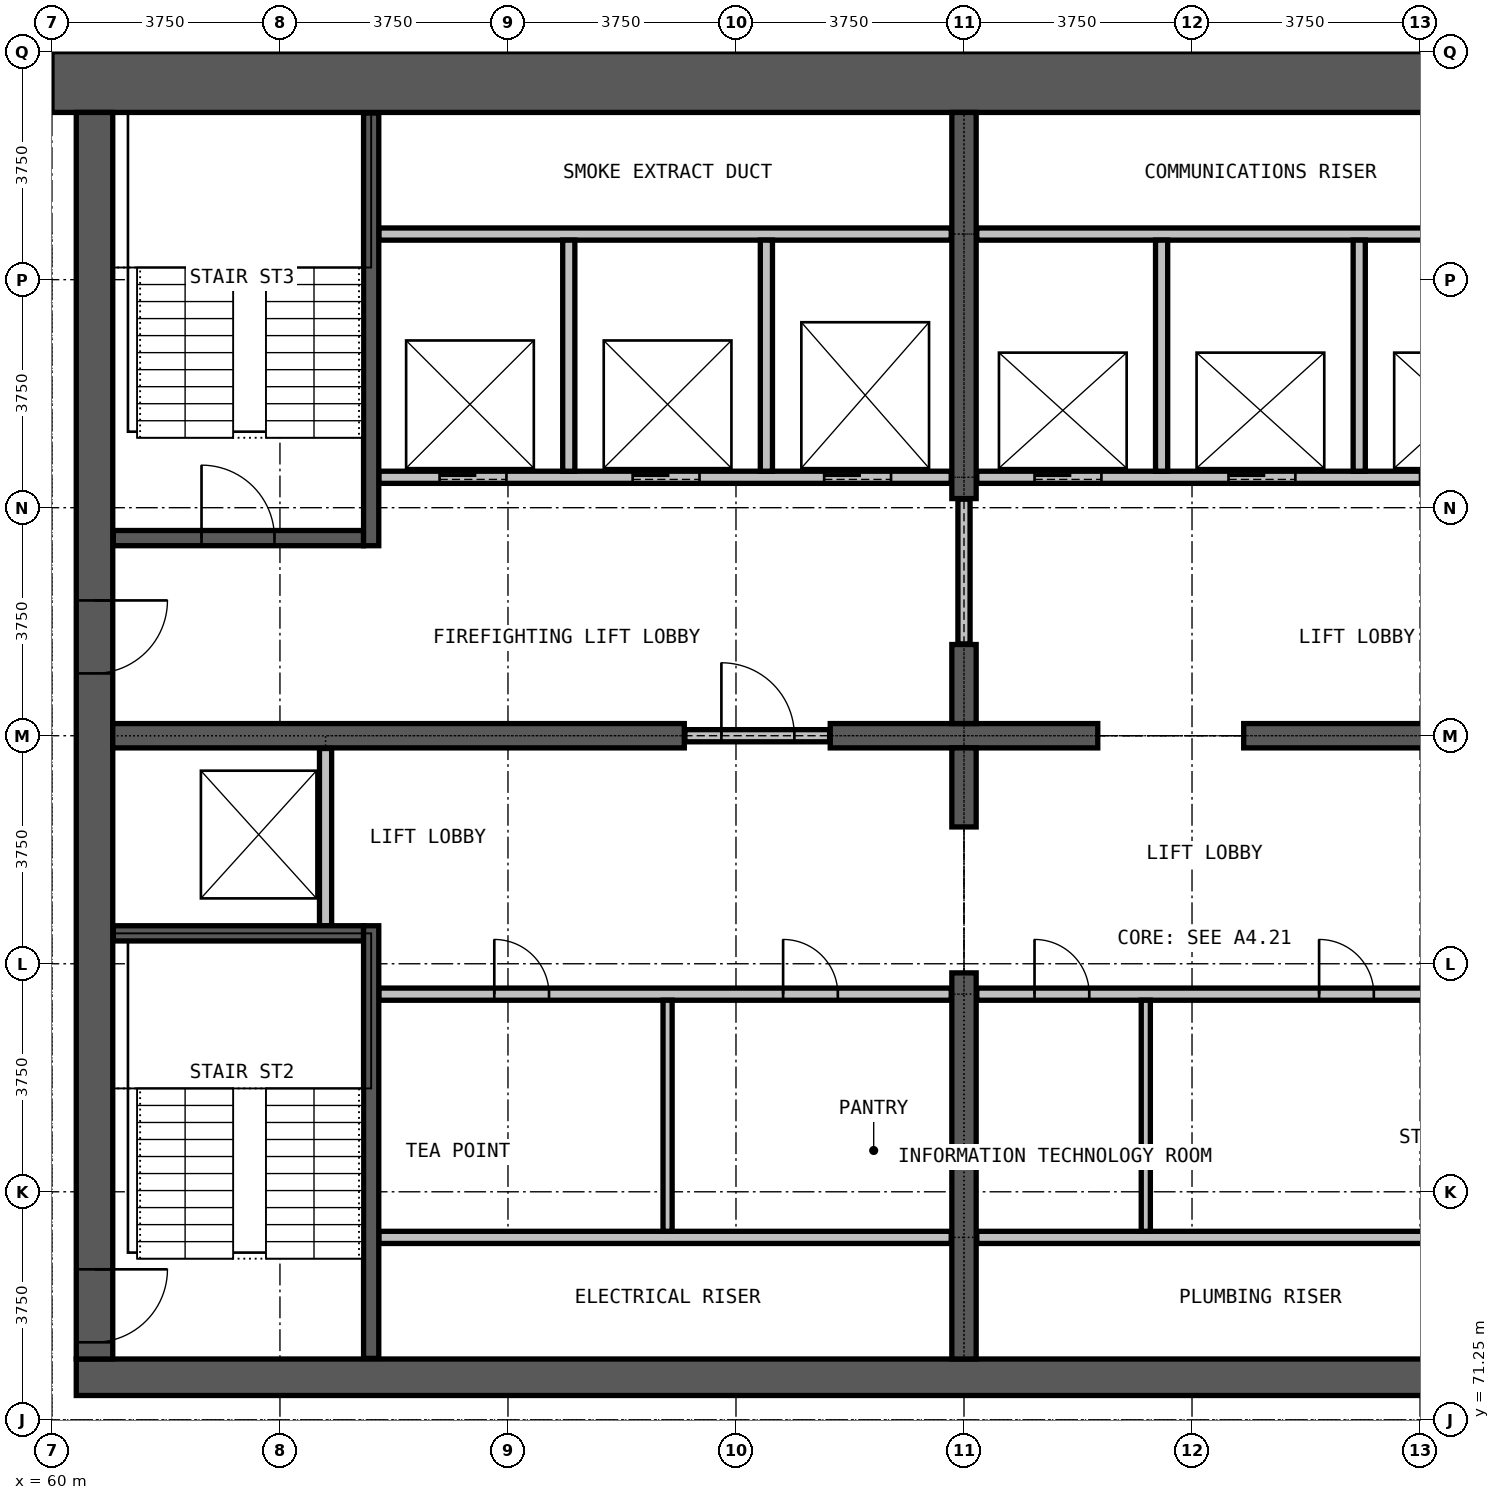
"""IFC4 building model, lengths in metres.
Left out: names, types, materials, properties, quantities, classifications, styles, units other than length and angle.
Written with IfcOpenShell. Run it as: python <this file> out.ifc"""

import sys

from ifc_helpers import new_model, si_unit, direction, frame, frame_2d, origin, place, context, subcontext, project, spatial, rectangle, extrude, element, fill, save


model = new_model("IFC4")
c1 = context("Model", 3, precision=1e-05, world=origin(), true_north=direction((0.0, 1.0)))
c2 = subcontext(c1, "Body", "Model", "MODEL_VIEW")
j1 = project(units=[si_unit("LENGTHUNIT", "METRE"), si_unit("PLANEANGLEUNIT", "RADIAN")], contexts=[c1])
p1 = place(None, origin())
s1 = spatial("IfcSite", under=j1, at=p1, CompositionType="ELEMENT")
p2 = place(p1, origin())
s2 = spatial("IfcBuilding", under=s1, at=p2, CompositionType="ELEMENT")
p3 = place(p2, frame((0.0, 0.0, 188.7)))
s3 = spatial("IfcBuildingStorey", under=s2, at=p3, CompositionType="ELEMENT", Elevation=188.7)
p4 = place(p3, frame((60.4, 71.95, 0.0), z_axis=(0.0, 0.0, 1.0), x_axis=(1.0, 0.0, 0.0)))
e1 = element("IfcWall", 1, at=p4, inside=s3, PredefinedType="SHEAR", context=c2, shape_type="SweptSolid", body=[
    extrude(rectangle(XDim=29.2, YDim=0.6, at=frame_2d((14.6, 0.0))), origin(), (0.0, 0.0, 1.0), 3.6),
])
p5 = place(p3, frame((90.0, 93.25, 0.0), z_axis=(0.0, 0.0, 1.0), x_axis=(-1.0, 0.0, 0.0)))
e2 = element("IfcWall", 2, at=p5, inside=s3, PredefinedType="SHEAR", context=c2, shape_type="SweptSolid", body=[
    extrude(rectangle(XDim=30.0, YDim=1.0, at=frame_2d((15.0, 0.0))), origin(), (0.0, 0.0, 1.0), 3.6),
])
p6 = place(p3, frame((60.7, 92.75, 0.0), z_axis=(0.0, 0.0, 1.0), x_axis=(0.0, -1.0, 0.0)))
e3 = element("IfcWall", 3, at=p6, inside=s3, PredefinedType="SHEAR", context=c2, shape_type="SweptSolid", body=[
    extrude(rectangle(XDim=20.5, YDim=0.6, at=frame_2d((10.25, 0.0))), origin(), (0.0, 0.0, 1.0), 3.6),
])
p7 = place(p6, frame((19.025, 0.0, 0.0)))
e4 = element("IfcOpeningElement", 4, at=p7, cuts=e3, PredefinedType="OPENING", context=c2, shape_type="SweptSolid", body=[
    extrude(rectangle(XDim=1.2, YDim=2.2, at=frame_2d((0.6, 1.1))), frame((0.0, 0.31, 0.0), z_axis=(0.0, -1.0, 0.0), x_axis=(1.0, 0.0, 0.0)), (0.0, 0.0, 1.0), 0.62),
])
p8 = place(p6, frame((8.025, 0.0, 0.0)))
e5 = element("IfcOpeningElement", 5, at=p8, cuts=e3, PredefinedType="OPENING", context=c2, shape_type="SweptSolid", body=[
    extrude(rectangle(XDim=1.2, YDim=2.2, at=frame_2d((0.6, 1.1))), frame((0.0, 0.31, 0.0), z_axis=(0.0, -1.0, 0.0), x_axis=(1.0, 0.0, 0.0)), (0.0, 0.0, 1.0), 0.62),
])
p9 = place(p3, frame((61.0, 82.5, 0.0), z_axis=(0.0, 0.0, 1.0), x_axis=(1.0, 0.0, 0.0)))
e6 = element("IfcWall", 6, at=p9, inside=s3, PredefinedType="SHEAR", context=c2, shape_type="SweptSolid", body=[
    extrude(rectangle(XDim=9.4, YDim=0.4, at=frame_2d((4.7, 0.0))), origin(), (0.0, 0.0, 1.0), 3.6),
])
p10 = place(p3, frame((72.8, 82.5, 0.0), z_axis=(0.0, 0.0, 1.0), x_axis=(1.0, 0.0, 0.0)))
e7 = element("IfcWall", 7, at=p10, inside=s3, PredefinedType="SHEAR", context=c2, shape_type="SweptSolid", body=[
    extrude(rectangle(XDim=4.4, YDim=0.4, at=frame_2d((2.2, 0.0))), origin(), (0.0, 0.0, 1.0), 3.6),
])
p11 = place(p3, frame((79.6, 82.5, 0.0), z_axis=(0.0, 0.0, 1.0), x_axis=(1.0, 0.0, 0.0)))
e8 = element("IfcWall", 8, at=p11, inside=s3, PredefinedType="SHEAR", context=c2, shape_type="SweptSolid", body=[
    extrude(rectangle(XDim=9.4, YDim=0.4, at=frame_2d((4.7, 0.0))), origin(), (0.0, 0.0, 1.0), 3.6),
])
p12 = place(p3, frame((75.0, 72.25, 0.0), z_axis=(0.0, 0.0, 1.0), x_axis=(0.0, 1.0, 0.0)))
e9 = element("IfcWall", 9, at=p12, inside=s3, PredefinedType="SHEAR", context=c2, shape_type="SweptSolid", body=[
    extrude(rectangle(XDim=6.35, YDim=0.4, at=frame_2d((3.175, 0.0))), origin(), (0.0, 0.0, 1.0), 3.6),
])
for number, where, z_axis, x_axis in (
    (10, (75.0, 81.0, 0.0), (0.0, 0.0, 1.0), (0.0, 1.0, 0.0)),
    (11, (75.0, 82.7, 0.0), (0.0, 0.0, 1.0), (0.0, 1.0, 0.0)),
):
    element("IfcWall", number, at=place(p3, frame(where, z_axis=z_axis, x_axis=x_axis)), inside=s3, PredefinedType="SHEAR", context=c2, shape_type="SweptSolid", body=[
        extrude(rectangle(XDim=1.3, YDim=0.4, at=frame_2d((0.65, 0.0))), origin(), (0.0, 0.0, 1.0), 3.6),
    ])
p13 = place(p3, frame((75.0, 86.4, 0.0), z_axis=(0.0, 0.0, 1.0), x_axis=(0.0, 1.0, 0.0)))
e12 = element("IfcWall", 12, at=p13, inside=s3, PredefinedType="SHEAR", context=c2, shape_type="SweptSolid", body=[
    extrude(rectangle(XDim=6.35, YDim=0.4, at=frame_2d((3.175, 0.0))), origin(), (0.0, 0.0, 1.0), 3.6),
])
for number, where, z_axis, x_axis in (
    (13, (65.375, 74.25, 0.0), (0.0, 0.0, 1.0), (1.0, 0.0, 0.0)),
    (14, (75.21, 74.25, 0.0), (0.0, 0.0, 1.0), (1.0, 0.0, 0.0)),
):
    element("IfcWall", number, at=place(p3, frame(where, z_axis=z_axis, x_axis=x_axis)), inside=s3, PredefinedType="PARTITIONING", context=c2, shape_type="SweptSolid", body=[
        extrude(rectangle(XDim=9.415, YDim=0.2, at=frame_2d((4.708, 0.0))), origin(), (0.0, 0.0, 1.0), 3.3),
    ])
p14 = place(p3, frame((65.375, 78.25, 0.0), z_axis=(0.0, 0.0, 1.0), x_axis=(1.0, 0.0, 0.0)))
e15 = element("IfcWall", 15, at=p14, inside=s3, PredefinedType="PARTITIONING", context=c2, shape_type="SweptSolid", body=[
    extrude(rectangle(XDim=9.415, YDim=0.2, at=frame_2d((4.708, 0.0))), origin(), (0.0, 0.0, 1.0), 3.3),
])
p15 = place(p14, frame((1.9, 0.0, 0.0)))
e16 = element("IfcOpeningElement", 16, at=p15, cuts=e15, PredefinedType="OPENING", context=c2, shape_type="SweptSolid", body=[
    extrude(rectangle(XDim=0.9, YDim=2.2, at=frame_2d((0.45, 1.1))), frame((0.0, 0.11, 0.0), z_axis=(0.0, -1.0, 0.0), x_axis=(1.0, 0.0, 0.0)), (0.0, 0.0, 1.0), 0.22),
])
p16 = place(p14, frame((6.65, 0.0, 0.0)))
e17 = element("IfcOpeningElement", 17, at=p16, cuts=e15, PredefinedType="OPENING", context=c2, shape_type="SweptSolid", body=[
    extrude(rectangle(XDim=0.9, YDim=2.2, at=frame_2d((0.45, 1.1))), frame((0.0, 0.11, 0.0), z_axis=(0.0, -1.0, 0.0), x_axis=(1.0, 0.0, 0.0)), (0.0, 0.0, 1.0), 0.22),
])
p17 = place(p3, frame((75.21, 78.25, 0.0), z_axis=(0.0, 0.0, 1.0), x_axis=(1.0, 0.0, 0.0)))
e18 = element("IfcWall", 18, at=p17, inside=s3, PredefinedType="PARTITIONING", context=c2, shape_type="SweptSolid", body=[
    extrude(rectangle(XDim=9.415, YDim=0.2, at=frame_2d((4.708, 0.0))), origin(), (0.0, 0.0, 1.0), 3.3),
])
p18 = place(p17, frame((0.95, 0.0, 0.0)))
e19 = element("IfcOpeningElement", 19, at=p18, cuts=e18, PredefinedType="OPENING", context=c2, shape_type="SweptSolid", body=[
    extrude(rectangle(XDim=0.9, YDim=2.2, at=frame_2d((0.45, 1.1))), frame((0.0, 0.11, 0.0), z_axis=(0.0, -1.0, 0.0), x_axis=(1.0, 0.0, 0.0)), (0.0, 0.0, 1.0), 0.22),
])
p19 = place(p17, frame((5.63, 0.0, 0.0)))
e20 = element("IfcOpeningElement", 20, at=p19, cuts=e18, PredefinedType="OPENING", context=c2, shape_type="SweptSolid", body=[
    extrude(rectangle(XDim=0.9, YDim=2.2, at=frame_2d((0.45, 1.1))), frame((0.0, 0.11, 0.0), z_axis=(0.0, -1.0, 0.0), x_axis=(1.0, 0.0, 0.0)), (0.0, 0.0, 1.0), 0.22),
])
p20 = place(p3, frame((70.41, 82.5, 0.0), z_axis=(0.0, 0.0, 1.0), x_axis=(1.0, 0.0, 0.0)))
e21 = element("IfcWall", 21, at=p20, inside=s3, PredefinedType="PARTITIONING", context=c2, shape_type="SweptSolid", body=[
    extrude(rectangle(XDim=2.38, YDim=0.2, at=frame_2d((1.19, 0.0))), origin(), (0.0, 0.0, 1.0), 2.4),
])
p21 = place(p20, frame((0.6, 0.0, 0.0)))
e22 = element("IfcOpeningElement", 22, at=p21, cuts=e21, PredefinedType="OPENING", context=c2, shape_type="SweptSolid", body=[
    extrude(rectangle(XDim=1.2, YDim=2.2, at=frame_2d((0.6, 1.1))), frame((0.0, 0.11, 0.0), z_axis=(0.0, -1.0, 0.0), x_axis=(1.0, 0.0, 0.0)), (0.0, 0.0, 1.0), 0.22),
])
p22 = place(p3, frame((75.0, 84.01, 0.0), z_axis=(0.0, 0.0, 1.0), x_axis=(0.0, 1.0, 0.0)))
e23 = element("IfcWall", 23, at=p22, inside=s3, PredefinedType="PARTITIONING", context=c2, shape_type="SweptSolid", body=[
    extrude(rectangle(XDim=2.38, YDim=0.2, at=frame_2d((1.19, 0.0))), origin(), (0.0, 0.0, 1.0), 2.4),
])
for number, where, z_axis, x_axis in (
    (24, (70.125, 74.35, 0.0), (0.0, 0.0, 1.0), (0.0, 1.0, 0.0)),
    (25, (77.99, 74.35, 0.0), (0.0, 0.0, 1.0), (0.0, 1.0, 0.0)),
):
    element("IfcWall", number, at=place(p3, frame(where, z_axis=z_axis, x_axis=x_axis)), inside=s3, PredefinedType="PARTITIONING", context=c2, shape_type="SweptSolid", body=[
        extrude(rectangle(XDim=3.8, YDim=0.15, at=frame_2d((1.9, 0.0))), origin(), (0.0, 0.0, 1.0), 3.3),
    ])
p23 = place(p3, frame((65.375, 86.75, 0.0), z_axis=(0.0, 0.0, 1.0), x_axis=(1.0, 0.0, 0.0)))
e26 = element("IfcWall", 26, at=p23, inside=s3, PredefinedType="PARTITIONING", context=c2, shape_type="SweptSolid", body=[
    extrude(rectangle(XDim=9.415, YDim=0.2, at=frame_2d((4.708, 0.0))), origin(), (0.0, 0.0, 1.0), 3.3),
])
p24 = place(p23, frame((1.0, 0.0, 0.0)))
e27 = element("IfcOpeningElement", 27, at=p24, cuts=e26, PredefinedType="OPENING", context=c2, shape_type="SweptSolid", body=[
    extrude(rectangle(XDim=1.1, YDim=2.2, at=frame_2d((0.55, 1.1))), frame((0.0, 0.11, 0.0), z_axis=(0.0, -1.0, 0.0), x_axis=(1.0, 0.0, 0.0)), (0.0, 0.0, 1.0), 0.22),
])
p25 = place(p23, frame((4.175, 0.0, 0.0)))
e28 = element("IfcOpeningElement", 28, at=p25, cuts=e26, PredefinedType="OPENING", context=c2, shape_type="SweptSolid", body=[
    extrude(rectangle(XDim=1.1, YDim=2.2, at=frame_2d((0.55, 1.1))), frame((0.0, 0.11, 0.0), z_axis=(0.0, -1.0, 0.0), x_axis=(1.0, 0.0, 0.0)), (0.0, 0.0, 1.0), 0.22),
])
p26 = place(p23, frame((7.325, 0.0, 0.0)))
e29 = element("IfcOpeningElement", 29, at=p26, cuts=e26, PredefinedType="OPENING", context=c2, shape_type="SweptSolid", body=[
    extrude(rectangle(XDim=1.1, YDim=2.2, at=frame_2d((0.55, 1.1))), frame((0.0, 0.11, 0.0), z_axis=(0.0, -1.0, 0.0), x_axis=(1.0, 0.0, 0.0)), (0.0, 0.0, 1.0), 0.22),
])
p27 = place(p3, frame((75.21, 86.75, 0.0), z_axis=(0.0, 0.0, 1.0), x_axis=(1.0, 0.0, 0.0)))
e30 = element("IfcWall", 30, at=p27, inside=s3, PredefinedType="PARTITIONING", context=c2, shape_type="SweptSolid", body=[
    extrude(rectangle(XDim=9.415, YDim=0.2, at=frame_2d((4.708, 0.0))), origin(), (0.0, 0.0, 1.0), 3.3),
])
p28 = place(p27, frame((0.95, 0.0, 0.0)))
e31 = element("IfcOpeningElement", 31, at=p28, cuts=e30, PredefinedType="OPENING", context=c2, shape_type="SweptSolid", body=[
    extrude(rectangle(XDim=1.1, YDim=2.2, at=frame_2d((0.55, 1.1))), frame((0.0, 0.11, 0.0), z_axis=(0.0, -1.0, 0.0), x_axis=(1.0, 0.0, 0.0)), (0.0, 0.0, 1.0), 0.22),
])
p29 = place(p27, frame((4.14, 0.0, 0.0)))
e32 = element("IfcOpeningElement", 32, at=p29, cuts=e30, PredefinedType="OPENING", context=c2, shape_type="SweptSolid", body=[
    extrude(rectangle(XDim=1.1, YDim=2.2, at=frame_2d((0.55, 1.1))), frame((0.0, 0.11, 0.0), z_axis=(0.0, -1.0, 0.0), x_axis=(1.0, 0.0, 0.0)), (0.0, 0.0, 1.0), 0.22),
])
p30 = place(p27, frame((7.29, 0.0, 0.0)))
e33 = element("IfcOpeningElement", 33, at=p30, cuts=e30, PredefinedType="OPENING", context=c2, shape_type="SweptSolid", body=[
    extrude(rectangle(XDim=1.1, YDim=2.2, at=frame_2d((0.55, 1.1))), frame((0.0, 0.11, 0.0), z_axis=(0.0, -1.0, 0.0), x_axis=(1.0, 0.0, 0.0)), (0.0, 0.0, 1.0), 0.22),
])
for number, where, z_axis, x_axis in (
    (34, (65.375, 90.75, 0.0), (0.0, 0.0, 1.0), (1.0, 0.0, 0.0)),
    (35, (75.21, 90.75, 0.0), (0.0, 0.0, 1.0), (1.0, 0.0, 0.0)),
):
    element("IfcWall", number, at=place(p3, frame(where, z_axis=z_axis, x_axis=x_axis)), inside=s3, PredefinedType="PARTITIONING", context=c2, shape_type="SweptSolid", body=[
        extrude(rectangle(XDim=9.415, YDim=0.2, at=frame_2d((4.708, 0.0))), origin(), (0.0, 0.0, 1.0), 3.3),
    ])
p31 = place(p3, frame((64.5, 79.375, 0.0), z_axis=(0.0, 0.0, 1.0), x_axis=(0.0, 1.0, 0.0)))
e36 = element("IfcWall", 36, at=p31, inside=s3, PredefinedType="PARTITIONING", context=c2, shape_type="SweptSolid", body=[
    extrude(rectangle(XDim=2.915, YDim=0.2, at=frame_2d((1.458, 0.0))), origin(), (0.0, 0.0, 1.0), 3.3),
])
for number, where, z_axis, x_axis in (
    (37, (68.5, 86.85, 0.0), (0.0, 0.0, 1.0), (0.0, 1.0, 0.0)),
    (38, (71.75, 86.85, 0.0), (0.0, 0.0, 1.0), (0.0, 1.0, 0.0)),
    (39, (78.25, 86.85, 0.0), (0.0, 0.0, 1.0), (0.0, 1.0, 0.0)),
    (40, (81.5, 86.85, 0.0), (0.0, 0.0, 1.0), (0.0, 1.0, 0.0)),
):
    element("IfcWall", number, at=place(p3, frame(where, z_axis=z_axis, x_axis=x_axis)), inside=s3, PredefinedType="PARTITIONING", context=c2, shape_type="SweptSolid", body=[
        extrude(rectangle(XDim=3.8, YDim=0.2, at=frame_2d((1.9, 0.0))), origin(), (0.0, 0.0, 1.0), 3.3),
    ])
p32 = place(p3, frame((61.01, 79.25, 0.0), z_axis=(0.0, 0.0, 1.0), x_axis=(1.0, 0.0, 0.0)))
e41 = element("IfcWall", 41, at=p32, inside=s3, PredefinedType="PARTITIONING", context=c2, shape_type="SweptSolid", body=[
    extrude(rectangle(XDim=4.115, YDim=0.25, at=frame_2d((2.058, 0.0))), origin(), (0.0, 0.0, 1.0), 3.3),
])
p33 = place(p3, frame((61.01, 85.75, 0.0), z_axis=(0.0, 0.0, 1.0), x_axis=(1.0, 0.0, 0.0)))
e42 = element("IfcWall", 42, at=p33, inside=s3, PredefinedType="PARTITIONING", context=c2, shape_type="SweptSolid", body=[
    extrude(rectangle(XDim=4.115, YDim=0.25, at=frame_2d((2.058, 0.0))), origin(), (0.0, 0.0, 1.0), 3.3),
])
p34 = place(p33, frame((1.45, 0.0, 0.0)))
e43 = element("IfcOpeningElement", 43, at=p34, cuts=e42, PredefinedType="OPENING", context=c2, shape_type="SweptSolid", body=[
    extrude(rectangle(XDim=1.2, YDim=2.2, at=frame_2d((0.6, 1.1))), frame((0.0, 0.135, 0.0), z_axis=(0.0, -1.0, 0.0), x_axis=(1.0, 0.0, 0.0)), (0.0, 0.0, 1.0), 0.27),
])
for number, where, z_axis, x_axis in (
    (44, (65.25, 72.26, 0.0), (0.0, 0.0, 1.0), (0.0, 1.0, 0.0)),
    (45, (65.25, 85.625, 0.0), (0.0, 0.0, 1.0), (0.0, 1.0, 0.0)),
):
    element("IfcWall", number, at=place(p3, frame(where, z_axis=z_axis, x_axis=x_axis)), inside=s3, PredefinedType="PARTITIONING", context=c2, shape_type="SweptSolid", body=[
        extrude(rectangle(XDim=7.115, YDim=0.25, at=frame_2d((3.558, 0.0))), origin(), (0.0, 0.0, 1.0), 3.3),
    ])
p35 = place(p28, origin())
e46 = element("IfcDoor", 46, at=p35, inside=s3, OperationType="DOUBLE_DOOR_SLIDING", PredefinedType="DOOR", context=c2, shape_type="SweptSolid", body=[
    extrude(rectangle(XDim=1.1, YDim=2.2, at=frame_2d((0.55, 1.1))), frame((0.0, 0.025, 0.0), z_axis=(0.0, -1.0, 0.0), x_axis=(1.0, 0.0, 0.0)), (0.0, 0.0, 1.0), 0.05),
])
fill(e31, e46)
p36 = place(p29, origin())
e47 = element("IfcDoor", 47, at=p36, inside=s3, OperationType="DOUBLE_DOOR_SLIDING", PredefinedType="DOOR", context=c2, shape_type="SweptSolid", body=[
    extrude(rectangle(XDim=1.1, YDim=2.2, at=frame_2d((0.55, 1.1))), frame((0.0, 0.025, 0.0), z_axis=(0.0, -1.0, 0.0), x_axis=(1.0, 0.0, 0.0)), (0.0, 0.0, 1.0), 0.05),
])
fill(e32, e47)
p37 = place(p24, origin())
e48 = element("IfcDoor", 48, at=p37, inside=s3, OperationType="DOUBLE_DOOR_SLIDING", PredefinedType="DOOR", context=c2, shape_type="SweptSolid", body=[
    extrude(rectangle(XDim=1.1, YDim=2.2, at=frame_2d((0.55, 1.1))), frame((0.0, 0.025, 0.0), z_axis=(0.0, -1.0, 0.0), x_axis=(1.0, 0.0, 0.0)), (0.0, 0.0, 1.0), 0.05),
])
fill(e27, e48)
p38 = place(p25, origin())
e49 = element("IfcDoor", 49, at=p38, inside=s3, OperationType="DOUBLE_DOOR_SLIDING", PredefinedType="DOOR", context=c2, shape_type="SweptSolid", body=[
    extrude(rectangle(XDim=1.1, YDim=2.2, at=frame_2d((0.55, 1.1))), frame((0.0, 0.025, 0.0), z_axis=(0.0, -1.0, 0.0), x_axis=(1.0, 0.0, 0.0)), (0.0, 0.0, 1.0), 0.05),
])
fill(e28, e49)
p39 = place(p26, origin())
e50 = element("IfcDoor", 50, at=p39, inside=s3, OperationType="DOUBLE_DOOR_SLIDING", PredefinedType="DOOR", context=c2, shape_type="SweptSolid", body=[
    extrude(rectangle(XDim=1.1, YDim=2.2, at=frame_2d((0.55, 1.1))), frame((0.0, 0.025, 0.0), z_axis=(0.0, -1.0, 0.0), x_axis=(1.0, 0.0, 0.0)), (0.0, 0.0, 1.0), 0.05),
])
fill(e29, e50)
p40 = place(p21, origin())
e51 = element("IfcDoor", 51, at=p40, inside=s3, OperationType="SINGLE_SWING_RIGHT", PredefinedType="DOOR", context=c2, shape_type="SweptSolid", body=[
    extrude(rectangle(XDim=1.2, YDim=2.2, at=frame_2d((0.6, 1.1))), frame((0.0, 0.025, 0.0), z_axis=(0.0, -1.0, 0.0), x_axis=(1.0, 0.0, 0.0)), (0.0, 0.0, 1.0), 0.05),
])
fill(e22, e51)
p41 = place(p34, origin())
e52 = element("IfcDoor", 52, at=p41, inside=s3, OperationType="SINGLE_SWING_LEFT", PredefinedType="DOOR", context=c2, shape_type="SweptSolid", body=[
    extrude(rectangle(XDim=1.2, YDim=2.2, at=frame_2d((0.6, 1.1))), frame((0.0, 0.025, 0.0), z_axis=(0.0, -1.0, 0.0), x_axis=(1.0, 0.0, 0.0)), (0.0, 0.0, 1.0), 0.05),
])
fill(e43, e52)
p42 = place(p7, origin())
e53 = element("IfcDoor", 53, at=p42, inside=s3, OperationType="SINGLE_SWING_LEFT", PredefinedType="DOOR", context=c2, shape_type="SweptSolid", body=[
    extrude(rectangle(XDim=1.2, YDim=2.2, at=frame_2d((0.6, 1.1))), frame((0.0, 0.025, 0.0), z_axis=(0.0, -1.0, 0.0), x_axis=(1.0, 0.0, 0.0)), (0.0, 0.0, 1.0), 0.05),
])
fill(e4, e53)
p43 = place(p8, origin())
e54 = element("IfcDoor", 54, at=p43, inside=s3, OperationType="SINGLE_SWING_RIGHT", PredefinedType="DOOR", context=c2, shape_type="SweptSolid", body=[
    extrude(rectangle(XDim=1.2, YDim=2.2, at=frame_2d((0.6, 1.1))), frame((0.0, 0.025, 0.0), z_axis=(0.0, -1.0, 0.0), x_axis=(1.0, 0.0, 0.0)), (0.0, 0.0, 1.0), 0.05),
])
fill(e5, e54)
p44 = place(p15, origin())
e55 = element("IfcDoor", 55, at=p44, inside=s3, OperationType="SINGLE_SWING_RIGHT", PredefinedType="DOOR", context=c2, shape_type="SweptSolid", body=[
    extrude(rectangle(XDim=0.9, YDim=2.2, at=frame_2d((0.45, 1.1))), frame((0.0, 0.025, 0.0), z_axis=(0.0, -1.0, 0.0), x_axis=(1.0, 0.0, 0.0)), (0.0, 0.0, 1.0), 0.05),
])
fill(e16, e55)
p45 = place(p16, origin())
e56 = element("IfcDoor", 56, at=p45, inside=s3, OperationType="SINGLE_SWING_LEFT", PredefinedType="DOOR", context=c2, shape_type="SweptSolid", body=[
    extrude(rectangle(XDim=0.9, YDim=2.2, at=frame_2d((0.45, 1.1))), frame((0.0, 0.025, 0.0), z_axis=(0.0, -1.0, 0.0), x_axis=(1.0, 0.0, 0.0)), (0.0, 0.0, 1.0), 0.05),
])
fill(e17, e56)
p46 = place(p18, origin())
e57 = element("IfcDoor", 57, at=p46, inside=s3, OperationType="SINGLE_SWING_LEFT", PredefinedType="DOOR", context=c2, shape_type="SweptSolid", body=[
    extrude(rectangle(XDim=0.9, YDim=2.2, at=frame_2d((0.45, 1.1))), frame((0.0, 0.025, 0.0), z_axis=(0.0, -1.0, 0.0), x_axis=(1.0, 0.0, 0.0)), (0.0, 0.0, 1.0), 0.05),
])
fill(e19, e57)
p47 = place(p19, origin())
e58 = element("IfcDoor", 58, at=p47, inside=s3, OperationType="SINGLE_SWING_LEFT", PredefinedType="DOOR", context=c2, shape_type="SweptSolid", body=[
    extrude(rectangle(XDim=0.9, YDim=2.2, at=frame_2d((0.45, 1.1))), frame((0.0, 0.025, 0.0), z_axis=(0.0, -1.0, 0.0), x_axis=(1.0, 0.0, 0.0)), (0.0, 0.0, 1.0), 0.05),
])
fill(e20, e58)
save(model, sys.argv[1])
